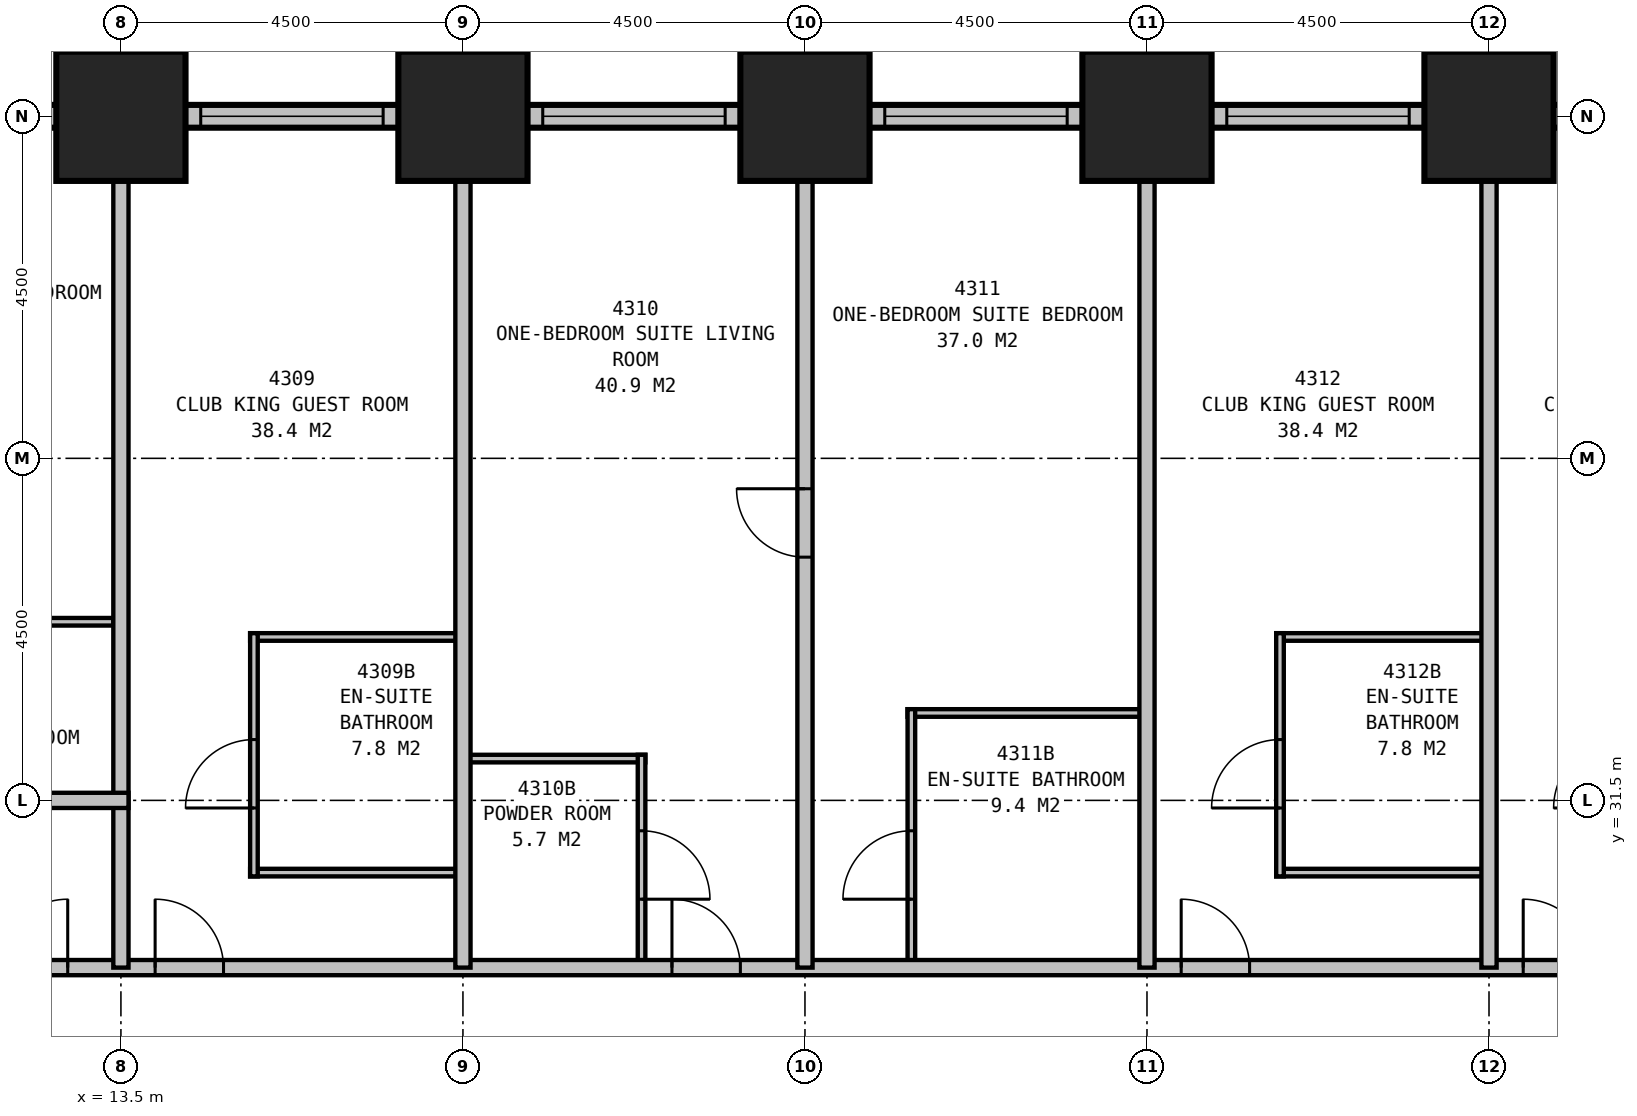
"""IFC4 building model, lengths in metres.
Left out: names, types, materials, properties, quantities, classifications, styles, units other than length and angle.
Written with IfcOpenShell. Run it as: python <this file> out.ifc"""

import sys

from ifc_helpers import new_model, si_unit, direction, frame, frame_2d, origin, origin_2d, place, context, subcontext, project, spatial, rectangle, extrude, element, fill, save


model = new_model("IFC4")
c1 = context("Model", 3, precision=1e-05, world=origin(), true_north=direction((0.0, 1.0)))
c2 = subcontext(c1, "Body", "Model", "MODEL_VIEW")
j1 = project(units=[si_unit("LENGTHUNIT", "METRE"), si_unit("PLANEANGLEUNIT", "RADIAN")], contexts=[c1])
p1 = place(None, origin())
s1 = spatial("IfcSite", under=j1, at=p1, CompositionType="ELEMENT")
p2 = place(p1, origin())
s2 = spatial("IfcBuilding", under=s1, at=p2, CompositionType="ELEMENT")
p3 = place(p2, frame((0.0, 0.0, 169.4)))
s3 = spatial("IfcBuildingStorey", under=s2, at=p3, CompositionType="ELEMENT", Elevation=169.4)
for number, where, z_axis, x_axis in (
    (1, (31.5, 40.5, 0.0), (0.0, 0.0, 1.0), (1.0, 0.0, 0.0)),
    (2, (27.0, 40.5, 0.0), (0.0, 0.0, 1.0), (1.0, 0.0, 0.0)),
    (3, (22.5, 40.5, 0.0), (0.0, 0.0, 1.0), (1.0, 0.0, 0.0)),
    (4, (18.0, 40.5, 0.0), (0.0, 0.0, 1.0), (1.0, 0.0, 0.0)),
    (5, (13.5, 40.5, 0.0), (0.0, 0.0, 1.0), (1.0, 0.0, 0.0)),
):
    element("IfcColumn", number, at=place(p3, frame(where, z_axis=z_axis, x_axis=x_axis)), inside=s3, PredefinedType="COLUMN", context=c2, shape_type="SweptSolid", body=[
        extrude(rectangle(XDim=1.7, YDim=1.7, at=origin_2d()), origin(), (0.0, 0.0, 1.0), 3.5),
    ])
p4 = place(p3, frame((40.65, 40.5, 0.0), z_axis=(0.0, 0.0, 1.0), x_axis=(-1.0, 0.0, 0.0)))
e6 = element("IfcWall", 6, at=p4, inside=s3, PredefinedType="STANDARD", context=c2, shape_type="SweptSolid", body=[
    extrude(rectangle(XDim=31.8, YDim=0.3, at=frame_2d((15.9, 0.0))), origin(), (0.0, 0.0, 1.0), 2.25),
])
p5 = place(p4, frame((1.2, 0.0, 0.5)))
e7 = element("IfcOpeningElement", 7, at=p5, cuts=e6, PredefinedType="OPENING", context=c2, shape_type="SweptSolid", body=[
    extrude(rectangle(XDim=2.4, YDim=1.6, at=frame_2d((1.2, 0.8))), frame((0.0, 0.16, 0.0), z_axis=(0.0, -1.0, 0.0), x_axis=(1.0, 0.0, 0.0)), (0.0, 0.0, 1.0), 0.32),
])
p6 = place(p4, frame((5.7, 0.0, 0.5)))
e8 = element("IfcOpeningElement", 8, at=p6, cuts=e6, PredefinedType="OPENING", context=c2, shape_type="SweptSolid", body=[
    extrude(rectangle(XDim=2.4, YDim=1.6, at=frame_2d((1.2, 0.8))), frame((0.0, 0.16, 0.0), z_axis=(0.0, -1.0, 0.0), x_axis=(1.0, 0.0, 0.0)), (0.0, 0.0, 1.0), 0.32),
])
p7 = place(p4, frame((10.2, 0.0, 0.5)))
e9 = element("IfcOpeningElement", 9, at=p7, cuts=e6, PredefinedType="OPENING", context=c2, shape_type="SweptSolid", body=[
    extrude(rectangle(XDim=2.4, YDim=1.6, at=frame_2d((1.2, 0.8))), frame((0.0, 0.16, 0.0), z_axis=(0.0, -1.0, 0.0), x_axis=(1.0, 0.0, 0.0)), (0.0, 0.0, 1.0), 0.32),
])
p8 = place(p4, frame((14.7, 0.0, 0.5)))
e10 = element("IfcOpeningElement", 10, at=p8, cuts=e6, PredefinedType="OPENING", context=c2, shape_type="SweptSolid", body=[
    extrude(rectangle(XDim=2.4, YDim=1.6, at=frame_2d((1.2, 0.8))), frame((0.0, 0.16, 0.0), z_axis=(0.0, -1.0, 0.0), x_axis=(1.0, 0.0, 0.0)), (0.0, 0.0, 1.0), 0.32),
])
p9 = place(p4, frame((19.2, 0.0, 0.5)))
e11 = element("IfcOpeningElement", 11, at=p9, cuts=e6, PredefinedType="OPENING", context=c2, shape_type="SweptSolid", body=[
    extrude(rectangle(XDim=2.4, YDim=1.6, at=frame_2d((1.2, 0.8))), frame((0.0, 0.16, 0.0), z_axis=(0.0, -1.0, 0.0), x_axis=(1.0, 0.0, 0.0)), (0.0, 0.0, 1.0), 0.32),
])
p10 = place(p4, frame((23.7, 0.0, 0.5)))
e12 = element("IfcOpeningElement", 12, at=p10, cuts=e6, PredefinedType="OPENING", context=c2, shape_type="SweptSolid", body=[
    extrude(rectangle(XDim=2.4, YDim=1.6, at=frame_2d((1.2, 0.8))), frame((0.0, 0.16, 0.0), z_axis=(0.0, -1.0, 0.0), x_axis=(1.0, 0.0, 0.0)), (0.0, 0.0, 1.0), 0.32),
])
p11 = place(p4, frame((28.2, 0.0, 0.5)))
e13 = element("IfcOpeningElement", 13, at=p11, cuts=e6, PredefinedType="OPENING", context=c2, shape_type="SweptSolid", body=[
    extrude(rectangle(XDim=2.4, YDim=1.6, at=frame_2d((1.2, 0.8))), frame((0.0, 0.16, 0.0), z_axis=(0.0, -1.0, 0.0), x_axis=(1.0, 0.0, 0.0)), (0.0, 0.0, 1.0), 0.32),
])
p12 = place(p3, frame((11.2, 29.3, 0.0), z_axis=(0.0, 0.0, 1.0), x_axis=(1.0, 0.0, 0.0)))
e14 = element("IfcWall", 14, at=p12, inside=s3, PredefinedType="PARTITIONING", context=c2, shape_type="SweptSolid", body=[
    extrude(rectangle(XDim=27.1, YDim=0.2, at=frame_2d((13.55, 0.0))), origin(), (0.0, 0.0, 1.0), 3.25),
])
p13 = place(p12, frame((2.75, 0.0, 0.0)))
e15 = element("IfcOpeningElement", 15, at=p13, cuts=e14, PredefinedType="OPENING", context=c2, shape_type="SweptSolid", body=[
    extrude(rectangle(XDim=0.9, YDim=2.1, at=frame_2d((0.45, 1.05))), frame((0.0, 0.11, 0.0), z_axis=(0.0, -1.0, 0.0), x_axis=(1.0, 0.0, 0.0)), (0.0, 0.0, 1.0), 0.22),
])
p14 = place(p12, frame((9.55, 0.0, 0.0)))
e16 = element("IfcOpeningElement", 16, at=p14, cuts=e14, PredefinedType="OPENING", context=c2, shape_type="SweptSolid", body=[
    extrude(rectangle(XDim=0.9, YDim=2.1, at=frame_2d((0.45, 1.05))), frame((0.0, 0.11, 0.0), z_axis=(0.0, -1.0, 0.0), x_axis=(1.0, 0.0, 0.0)), (0.0, 0.0, 1.0), 0.22),
])
p15 = place(p12, frame((16.25, 0.0, 0.0)))
e17 = element("IfcOpeningElement", 17, at=p15, cuts=e14, PredefinedType="OPENING", context=c2, shape_type="SweptSolid", body=[
    extrude(rectangle(XDim=0.9, YDim=2.1, at=frame_2d((0.45, 1.05))), frame((0.0, 0.11, 0.0), z_axis=(0.0, -1.0, 0.0), x_axis=(1.0, 0.0, 0.0)), (0.0, 0.0, 1.0), 0.22),
])
p16 = place(p12, frame((20.75, 0.0, 0.0)))
e18 = element("IfcOpeningElement", 18, at=p16, cuts=e14, PredefinedType="OPENING", context=c2, shape_type="SweptSolid", body=[
    extrude(rectangle(XDim=0.9, YDim=2.1, at=frame_2d((0.45, 1.05))), frame((0.0, 0.11, 0.0), z_axis=(0.0, -1.0, 0.0), x_axis=(1.0, 0.0, 0.0)), (0.0, 0.0, 1.0), 0.22),
])
p17 = place(p12, frame((25.5, 0.0, 0.0)))
e19 = element("IfcOpeningElement", 19, at=p17, cuts=e14, PredefinedType="OPENING", context=c2, shape_type="SweptSolid", body=[
    extrude(rectangle(XDim=0.9, YDim=2.1, at=frame_2d((0.45, 1.05))), frame((0.0, 0.11, 0.0), z_axis=(0.0, -1.0, 0.0), x_axis=(1.0, 0.0, 0.0)), (0.0, 0.0, 1.0), 0.22),
])
p18 = place(p12, frame((0.7, 0.0, 0.0)))
e20 = element("IfcOpeningElement", 20, at=p18, cuts=e14, PredefinedType="OPENING", context=c2, shape_type="SweptSolid", body=[
    extrude(rectangle(XDim=0.9, YDim=2.1, at=frame_2d((0.45, 1.05))), frame((0.0, 0.11, 0.0), z_axis=(0.0, -1.0, 0.0), x_axis=(1.0, 0.0, 0.0)), (0.0, 0.0, 1.0), 0.22),
])
p19 = place(p3, frame((18.0, 29.3, 0.0), z_axis=(0.0, 0.0, 1.0), x_axis=(0.0, 1.0, 0.0)))
e21 = element("IfcWall", 21, at=p19, inside=s3, PredefinedType="PARTITIONING", context=c2, shape_type="SweptSolid", body=[
    extrude(rectangle(XDim=11.2, YDim=0.2, at=frame_2d((5.6, 0.0))), origin(), (0.0, 0.0, 1.0), 2.25),
])
p20 = place(p3, frame((22.5, 29.3, 0.0), z_axis=(0.0, 0.0, 1.0), x_axis=(0.0, 1.0, 0.0)))
e22 = element("IfcWall", 22, at=p20, inside=s3, PredefinedType="PARTITIONING", context=c2, shape_type="SweptSolid", body=[
    extrude(rectangle(XDim=11.2, YDim=0.2, at=frame_2d((5.6, 0.0))), origin(), (0.0, 0.0, 1.0), 2.25),
])
p21 = place(p20, frame((5.4, 0.0, 0.0)))
e23 = element("IfcOpeningElement", 23, at=p21, cuts=e22, PredefinedType="OPENING", context=c2, shape_type="SweptSolid", body=[
    extrude(rectangle(XDim=0.9, YDim=2.1, at=frame_2d((0.45, 1.05))), frame((0.0, 0.11, 0.0), z_axis=(0.0, -1.0, 0.0), x_axis=(1.0, 0.0, 0.0)), (0.0, 0.0, 1.0), 0.22),
])
for number, where, z_axis, x_axis in (
    (24, (27.0, 29.3, 0.0), (0.0, 0.0, 1.0), (0.0, 1.0, 0.0)),
    (25, (31.5, 29.3, 0.0), (0.0, 0.0, 1.0), (0.0, 1.0, 0.0)),
):
    element("IfcWall", number, at=place(p3, frame(where, z_axis=z_axis, x_axis=x_axis)), inside=s3, PredefinedType="PARTITIONING", context=c2, shape_type="SweptSolid", body=[
        extrude(rectangle(XDim=11.2, YDim=0.2, at=frame_2d((5.6, 0.0))), origin(), (0.0, 0.0, 1.0), 2.25),
    ])
for number, where, z_axis, x_axis in (
    (26, (15.2, 30.55, 0.0), (0.0, 0.0, 1.0), (1.0, 0.0, 0.0)),
    (27, (15.2, 33.65, 0.0), (0.0, 0.0, 1.0), (1.0, 0.0, 0.0)),
):
    element("IfcWall", number, at=place(p3, frame(where, z_axis=z_axis, x_axis=x_axis)), inside=s3, PredefinedType="PLUMBINGWALL", context=c2, shape_type="SweptSolid", body=[
        extrude(rectangle(XDim=2.8, YDim=0.1, at=frame_2d((1.4, 0.0))), origin(), (0.0, 0.0, 1.0), 3.25),
    ])
p22 = place(p3, frame((15.25, 30.5, 0.0), z_axis=(0.0, 0.0, 1.0), x_axis=(0.0, 1.0, 0.0)))
e28 = element("IfcWall", 28, at=p22, inside=s3, PredefinedType="PLUMBINGWALL", context=c2, shape_type="SweptSolid", body=[
    extrude(rectangle(XDim=3.2, YDim=0.1, at=frame_2d((1.6, 0.0))), origin(), (0.0, 0.0, 1.0), 3.25),
])
p23 = place(p22, frame((0.9, 0.0, 0.0)))
e29 = element("IfcOpeningElement", 29, at=p23, cuts=e28, PredefinedType="OPENING", context=c2, shape_type="SweptSolid", body=[
    extrude(rectangle(XDim=0.9, YDim=2.1, at=frame_2d((0.45, 1.05))), frame((0.0, 0.06, 0.0), z_axis=(0.0, -1.0, 0.0), x_axis=(1.0, 0.0, 0.0)), (0.0, 0.0, 1.0), 0.12),
])
p24 = place(p3, frame((18.0, 32.05, 0.0), z_axis=(0.0, 0.0, 1.0), x_axis=(1.0, 0.0, 0.0)))
e30 = element("IfcWall", 30, at=p24, inside=s3, PredefinedType="PLUMBINGWALL", context=c2, shape_type="SweptSolid", body=[
    extrude(rectangle(XDim=2.4, YDim=0.1, at=frame_2d((1.2, 0.0))), origin(), (0.0, 0.0, 1.0), 3.25),
])
p25 = place(p3, frame((20.35, 29.3, 0.0), z_axis=(0.0, 0.0, 1.0), x_axis=(0.0, 1.0, 0.0)))
e31 = element("IfcWall", 31, at=p25, inside=s3, PredefinedType="PLUMBINGWALL", context=c2, shape_type="SweptSolid", body=[
    extrude(rectangle(XDim=2.8, YDim=0.1, at=frame_2d((1.4, 0.0))), origin(), (0.0, 0.0, 1.0), 3.25),
])
p26 = place(p25, frame((1.8, 0.0, 0.0), z_axis=(0.0, 0.0, 1.0), x_axis=(-1.0, 0.0, 0.0)))
e32 = element("IfcOpeningElement", 32, at=p26, cuts=e31, PredefinedType="OPENING", context=c2, shape_type="SweptSolid", body=[
    extrude(rectangle(XDim=0.9, YDim=2.1, at=frame_2d((0.45, 1.05))), frame((0.0, 0.06, 0.0), z_axis=(0.0, -1.0, 0.0), x_axis=(1.0, 0.0, 0.0)), (0.0, 0.0, 1.0), 0.12),
])
p27 = place(p3, frame((23.85, 32.65, 0.0), z_axis=(0.0, 0.0, 1.0), x_axis=(1.0, 0.0, 0.0)))
e33 = element("IfcWall", 33, at=p27, inside=s3, PredefinedType="PLUMBINGWALL", context=c2, shape_type="SweptSolid", body=[
    extrude(rectangle(XDim=3.15, YDim=0.1, at=frame_2d((1.575, 0.0))), origin(), (0.0, 0.0, 1.0), 3.25),
])
p28 = place(p3, frame((23.9, 29.3, 0.0), z_axis=(0.0, 0.0, 1.0), x_axis=(0.0, 1.0, 0.0)))
e34 = element("IfcWall", 34, at=p28, inside=s3, PredefinedType="PLUMBINGWALL", context=c2, shape_type="SweptSolid", body=[
    extrude(rectangle(XDim=3.4, YDim=0.1, at=frame_2d((1.7, 0.0))), origin(), (0.0, 0.0, 1.0), 3.25),
])
p29 = place(p28, frame((0.9, 0.0, 0.0)))
e35 = element("IfcOpeningElement", 35, at=p29, cuts=e34, PredefinedType="OPENING", context=c2, shape_type="SweptSolid", body=[
    extrude(rectangle(XDim=0.9, YDim=2.1, at=frame_2d((0.45, 1.05))), frame((0.0, 0.06, 0.0), z_axis=(0.0, -1.0, 0.0), x_axis=(1.0, 0.0, 0.0)), (0.0, 0.0, 1.0), 0.12),
])
for number, where, z_axis, x_axis in (
    (36, (28.7, 30.55, 0.0), (0.0, 0.0, 1.0), (1.0, 0.0, 0.0)),
    (37, (28.7, 33.65, 0.0), (0.0, 0.0, 1.0), (1.0, 0.0, 0.0)),
):
    element("IfcWall", number, at=place(p3, frame(where, z_axis=z_axis, x_axis=x_axis)), inside=s3, PredefinedType="PLUMBINGWALL", context=c2, shape_type="SweptSolid", body=[
        extrude(rectangle(XDim=2.8, YDim=0.1, at=frame_2d((1.4, 0.0))), origin(), (0.0, 0.0, 1.0), 3.25),
    ])
p30 = place(p3, frame((28.75, 30.5, 0.0), z_axis=(0.0, 0.0, 1.0), x_axis=(0.0, 1.0, 0.0)))
e38 = element("IfcWall", 38, at=p30, inside=s3, PredefinedType="PLUMBINGWALL", context=c2, shape_type="SweptSolid", body=[
    extrude(rectangle(XDim=3.2, YDim=0.1, at=frame_2d((1.6, 0.0))), origin(), (0.0, 0.0, 1.0), 3.25),
])
p31 = place(p30, frame((0.9, 0.0, 0.0)))
e39 = element("IfcOpeningElement", 39, at=p31, cuts=e38, PredefinedType="OPENING", context=c2, shape_type="SweptSolid", body=[
    extrude(rectangle(XDim=0.9, YDim=2.1, at=frame_2d((0.45, 1.05))), frame((0.0, 0.06, 0.0), z_axis=(0.0, -1.0, 0.0), x_axis=(1.0, 0.0, 0.0)), (0.0, 0.0, 1.0), 0.12),
])
p32 = place(p3, frame((13.5, 29.3, 0.0), z_axis=(0.0, 0.0, 1.0), x_axis=(0.0, 1.0, 0.0)))
e40 = element("IfcWall", 40, at=p32, inside=s3, PredefinedType="PARTITIONING", context=c2, shape_type="SweptSolid", body=[
    extrude(rectangle(XDim=11.2, YDim=0.2, at=frame_2d((5.6, 0.0))), origin(), (0.0, 0.0, 1.0), 2.25),
])
p33 = place(p3, frame((13.6, 31.5, 0.0), z_axis=(0.0, 0.0, 1.0), x_axis=(-1.0, 0.0, 0.0)))
e41 = element("IfcWall", 41, at=p33, inside=s3, PredefinedType="PARTITIONING", context=c2, shape_type="SweptSolid", body=[
    extrude(rectangle(XDim=10.099, YDim=0.2, at=frame_2d((5.05, 0.0))), origin(), (0.0, 0.0, 1.0), 3.25),
])
p34 = place(p33, frame((8.999, 0.0, 0.0), z_axis=(0.0, 0.0, 1.0), x_axis=(-1.0, 0.0, 0.0)))
e42 = element("IfcOpeningElement", 42, at=p34, cuts=e41, PredefinedType="OPENING", context=c2, shape_type="SweptSolid", body=[
    extrude(rectangle(XDim=0.9, YDim=2.1, at=frame_2d((0.45, 1.05))), frame((0.0, 0.11, 0.0), z_axis=(0.0, -1.0, 0.0), x_axis=(1.0, 0.0, 0.0)), (0.0, 0.0, 1.0), 0.22),
])
p35 = place(p3, frame((13.4, 33.85, 0.0), z_axis=(0.0, 0.0, 1.0), x_axis=(-1.0, 0.0, 0.0)))
e43 = element("IfcWall", 43, at=p35, inside=s3, PredefinedType="PLUMBINGWALL", context=c2, shape_type="SweptSolid", body=[
    extrude(rectangle(XDim=3.3, YDim=0.1, at=frame_2d((1.65, 0.0))), origin(), (0.0, 0.0, 1.0), 3.25),
])
p36 = place(p35, frame((1.8, 0.0, 0.0), z_axis=(0.0, 0.0, 1.0), x_axis=(-1.0, 0.0, 0.0)))
e44 = element("IfcOpeningElement", 44, at=p36, cuts=e43, PredefinedType="OPENING", context=c2, shape_type="SweptSolid", body=[
    extrude(rectangle(XDim=0.9, YDim=2.1, at=frame_2d((0.45, 1.05))), frame((0.0, 0.06, 0.0), z_axis=(0.0, -1.0, 0.0), x_axis=(1.0, 0.0, 0.0)), (0.0, 0.0, 1.0), 0.12),
])
p37 = place(p7, origin())
e45 = element("IfcWindow", 45, at=p37, inside=s3, PartitioningType="SINGLE_PANEL", PredefinedType="WINDOW", context=c2, shape_type="SweptSolid", body=[
    extrude(rectangle(XDim=2.4, YDim=1.6, at=frame_2d((1.2, 0.8))), frame((0.0, 0.03, 0.0), z_axis=(0.0, -1.0, 0.0), x_axis=(1.0, 0.0, 0.0)), (0.0, 0.0, 1.0), 0.06),
])
fill(e9, e45)
p38 = place(p8, origin())
e46 = element("IfcWindow", 46, at=p38, inside=s3, PartitioningType="SINGLE_PANEL", PredefinedType="WINDOW", context=c2, shape_type="SweptSolid", body=[
    extrude(rectangle(XDim=2.4, YDim=1.6, at=frame_2d((1.2, 0.8))), frame((0.0, 0.03, 0.0), z_axis=(0.0, -1.0, 0.0), x_axis=(1.0, 0.0, 0.0)), (0.0, 0.0, 1.0), 0.06),
])
fill(e10, e46)
p39 = place(p9, origin())
e47 = element("IfcWindow", 47, at=p39, inside=s3, PartitioningType="SINGLE_PANEL", PredefinedType="WINDOW", context=c2, shape_type="SweptSolid", body=[
    extrude(rectangle(XDim=2.4, YDim=1.6, at=frame_2d((1.2, 0.8))), frame((0.0, 0.03, 0.0), z_axis=(0.0, -1.0, 0.0), x_axis=(1.0, 0.0, 0.0)), (0.0, 0.0, 1.0), 0.06),
])
fill(e11, e47)
p40 = place(p10, origin())
e48 = element("IfcWindow", 48, at=p40, inside=s3, PartitioningType="SINGLE_PANEL", PredefinedType="WINDOW", context=c2, shape_type="SweptSolid", body=[
    extrude(rectangle(XDim=2.4, YDim=1.6, at=frame_2d((1.2, 0.8))), frame((0.0, 0.03, 0.0), z_axis=(0.0, -1.0, 0.0), x_axis=(1.0, 0.0, 0.0)), (0.0, 0.0, 1.0), 0.06),
])
fill(e12, e48)
p41 = place(p13, origin())
e49 = element("IfcDoor", 49, at=p41, inside=s3, OperationType="SINGLE_SWING_LEFT", PredefinedType="DOOR", context=c2, shape_type="SweptSolid", body=[
    extrude(rectangle(XDim=0.9, YDim=2.1, at=frame_2d((0.45, 1.05))), frame((0.0, 0.025, 0.0), z_axis=(0.0, -1.0, 0.0), x_axis=(1.0, 0.0, 0.0)), (0.0, 0.0, 1.0), 0.05),
])
fill(e15, e49)
p42 = place(p14, origin())
e50 = element("IfcDoor", 50, at=p42, inside=s3, OperationType="SINGLE_SWING_LEFT", PredefinedType="DOOR", context=c2, shape_type="SweptSolid", body=[
    extrude(rectangle(XDim=0.9, YDim=2.1, at=frame_2d((0.45, 1.05))), frame((0.0, 0.025, 0.0), z_axis=(0.0, -1.0, 0.0), x_axis=(1.0, 0.0, 0.0)), (0.0, 0.0, 1.0), 0.05),
])
fill(e16, e50)
p43 = place(p15, origin())
e51 = element("IfcDoor", 51, at=p43, inside=s3, OperationType="SINGLE_SWING_LEFT", PredefinedType="DOOR", context=c2, shape_type="SweptSolid", body=[
    extrude(rectangle(XDim=0.9, YDim=2.1, at=frame_2d((0.45, 1.05))), frame((0.0, 0.025, 0.0), z_axis=(0.0, -1.0, 0.0), x_axis=(1.0, 0.0, 0.0)), (0.0, 0.0, 1.0), 0.05),
])
fill(e17, e51)
p44 = place(p16, origin())
e52 = element("IfcDoor", 52, at=p44, inside=s3, OperationType="SINGLE_SWING_LEFT", PredefinedType="DOOR", context=c2, shape_type="SweptSolid", body=[
    extrude(rectangle(XDim=0.9, YDim=2.1, at=frame_2d((0.45, 1.05))), frame((0.0, 0.025, 0.0), z_axis=(0.0, -1.0, 0.0), x_axis=(1.0, 0.0, 0.0)), (0.0, 0.0, 1.0), 0.05),
])
fill(e18, e52)
p45 = place(p18, origin())
e53 = element("IfcDoor", 53, at=p45, inside=s3, OperationType="SINGLE_SWING_RIGHT", PredefinedType="DOOR", context=c2, shape_type="SweptSolid", body=[
    extrude(rectangle(XDim=0.9, YDim=2.1, at=frame_2d((0.45, 1.05))), frame((0.0, 0.025, 0.0), z_axis=(0.0, -1.0, 0.0), x_axis=(1.0, 0.0, 0.0)), (0.0, 0.0, 1.0), 0.05),
])
fill(e20, e53)
p46 = place(p21, origin())
e54 = element("IfcDoor", 54, at=p46, inside=s3, OperationType="SINGLE_SWING_RIGHT", PredefinedType="DOOR", context=c2, shape_type="SweptSolid", body=[
    extrude(rectangle(XDim=0.9, YDim=2.1, at=frame_2d((0.45, 1.05))), frame((0.0, 0.025, 0.0), z_axis=(0.0, -1.0, 0.0), x_axis=(1.0, 0.0, 0.0)), (0.0, 0.0, 1.0), 0.05),
])
fill(e23, e54)
p47 = place(p23, origin())
e55 = element("IfcDoor", 55, at=p47, inside=s3, OperationType="SINGLE_SWING_LEFT", PredefinedType="DOOR", context=c2, shape_type="SweptSolid", body=[
    extrude(rectangle(XDim=0.9, YDim=2.1, at=frame_2d((0.45, 1.05))), frame((0.0, 0.025, 0.0), z_axis=(0.0, -1.0, 0.0), x_axis=(1.0, 0.0, 0.0)), (0.0, 0.0, 1.0), 0.05),
])
fill(e29, e55)
p48 = place(p26, origin())
e56 = element("IfcDoor", 56, at=p48, inside=s3, OperationType="SINGLE_SWING_RIGHT", PredefinedType="DOOR", context=c2, shape_type="SweptSolid", body=[
    extrude(rectangle(XDim=0.9, YDim=2.1, at=frame_2d((0.45, 1.05))), frame((0.0, 0.025, 0.0), z_axis=(0.0, -1.0, 0.0), x_axis=(1.0, 0.0, 0.0)), (0.0, 0.0, 1.0), 0.05),
])
fill(e32, e56)
p49 = place(p29, origin())
e57 = element("IfcDoor", 57, at=p49, inside=s3, OperationType="SINGLE_SWING_LEFT", PredefinedType="DOOR", context=c2, shape_type="SweptSolid", body=[
    extrude(rectangle(XDim=0.9, YDim=2.1, at=frame_2d((0.45, 1.05))), frame((0.0, 0.025, 0.0), z_axis=(0.0, -1.0, 0.0), x_axis=(1.0, 0.0, 0.0)), (0.0, 0.0, 1.0), 0.05),
])
fill(e35, e57)
p50 = place(p31, origin())
e58 = element("IfcDoor", 58, at=p50, inside=s3, OperationType="SINGLE_SWING_LEFT", PredefinedType="DOOR", context=c2, shape_type="SweptSolid", body=[
    extrude(rectangle(XDim=0.9, YDim=2.1, at=frame_2d((0.45, 1.05))), frame((0.0, 0.025, 0.0), z_axis=(0.0, -1.0, 0.0), x_axis=(1.0, 0.0, 0.0)), (0.0, 0.0, 1.0), 0.05),
])
fill(e39, e58)
save(model, sys.argv[1])
